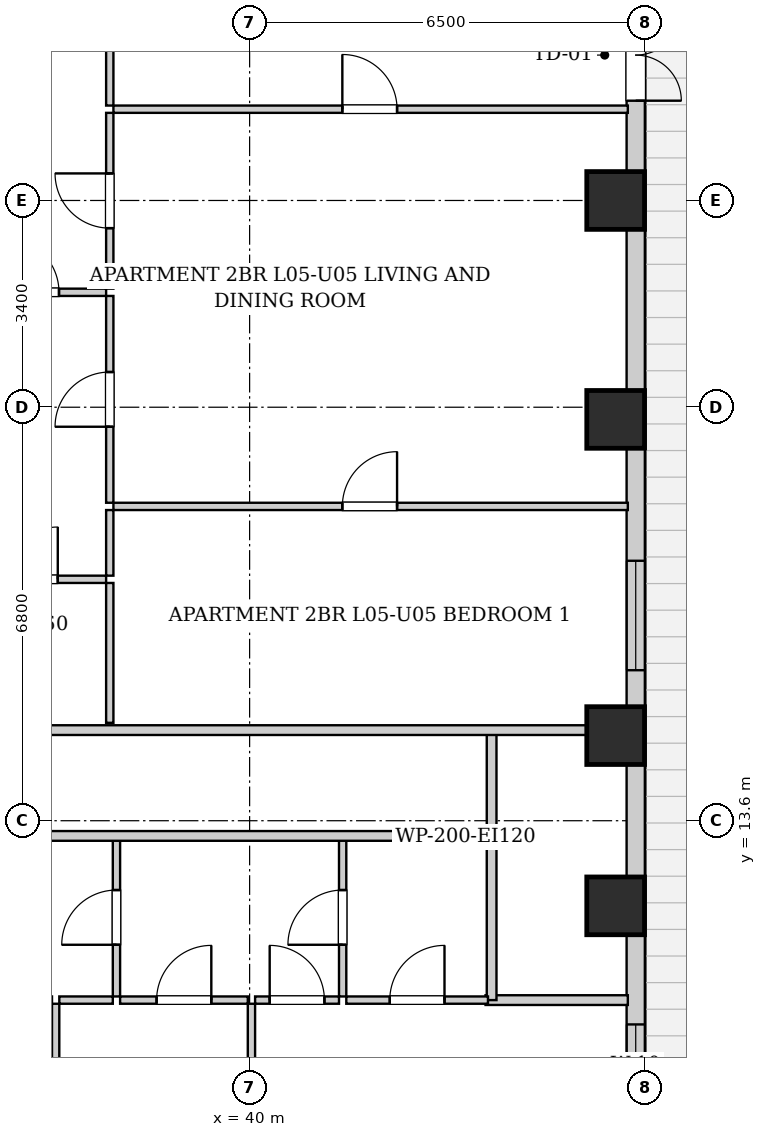
"""IFC4 building model, lengths in metres.
Left out: names, types, materials, properties, quantities, classifications, styles, units other than length and angle.
Written with IfcOpenShell. Run it as: python <this file> out.ifc"""

import sys

from ifc_helpers import new_model, si_unit, direction, frame, frame_2d, origin, origin_2d, place, context, subcontext, project, spatial, rectangle, extrude, element, fill, save


model = new_model("IFC4")
c1 = context("Model", 3, precision=1e-05, world=origin(), true_north=direction((0.0, 1.0)))
c2 = subcontext(c1, "Body", "Model", "MODEL_VIEW")
j1 = project(units=[si_unit("LENGTHUNIT", "METRE"), si_unit("PLANEANGLEUNIT", "RADIAN")], contexts=[c1])
p1 = place(None, origin())
s1 = spatial("IfcSite", under=j1, at=p1, CompositionType="ELEMENT")
p2 = place(p1, origin())
s2 = spatial("IfcBuilding", under=s1, at=p2, CompositionType="ELEMENT")
p3 = place(p2, frame((0.0, 0.0, 25.8)))
s3 = spatial("IfcBuildingStorey", under=s2, at=p3, CompositionType="ELEMENT", Elevation=25.8)
for number, where, z_axis, x_axis in (
    (1, (46.02, 12.2, 0.0), (0.0, 0.0, 1.0), (1.0, 0.0, 0.0)),
    (2, (46.02, 15.0, 0.0), (0.0, 0.0, 1.0), (1.0, 0.0, 0.0)),
    (3, (46.02, 20.2, 0.0), (0.0, 0.0, 1.0), (1.0, 0.0, 0.0)),
    (4, (46.02, 23.8, 0.0), (0.0, 0.0, 1.0), (1.0, 0.0, 0.0)),
):
    element("IfcColumn", number, at=place(p3, frame(where, z_axis=z_axis, x_axis=x_axis)), inside=s3, PredefinedType="COLUMN", context=c2, shape_type="SweptSolid", body=[
        extrude(rectangle(XDim=0.95, YDim=0.95, at=origin_2d()), origin(), (0.0, 0.0, 1.0), 3.2),
    ])
p4 = place(p3, frame((46.35, 45.1, 0.0), z_axis=(0.0, 0.0, 1.0), x_axis=(0.0, -1.0, 0.0)))
e5 = element("IfcWall", 5, at=p4, inside=s3, PredefinedType="SOLIDWALL", context=c2, shape_type="SweptSolid", body=[
    extrude(rectangle(XDim=42.6, YDim=0.3, at=frame_2d((21.3, 0.0))), origin(), (0.0, 0.0, 1.0), 1.988),
])
p5 = place(p4, frame((18.159, 0.0, 0.0)))
e6 = element("IfcOpeningElement", 6, at=p5, cuts=e5, PredefinedType="OPENING", context=c2, shape_type="SweptSolid", body=[
    extrude(rectangle(XDim=1.5, YDim=1.982, at=frame_2d((0.75, 0.991))), frame((0.0, 0.16, 0.0), z_axis=(0.0, -1.0, 0.0), x_axis=(1.0, 0.0, 0.0)), (0.0, 0.0, 1.0), 0.32),
])
p6 = place(p4, frame((37.575, 0.0, 0.55)))
e7 = element("IfcOpeningElement", 7, at=p6, cuts=e5, PredefinedType="OPENING", context=c2, shape_type="SweptSolid", body=[
    extrude(rectangle(XDim=1.8, YDim=1.2, at=frame_2d((0.9, 0.6))), frame((0.0, 0.16, 0.0), z_axis=(0.0, -1.0, 0.0), x_axis=(1.0, 0.0, 0.0)), (0.0, 0.0, 1.0), 0.32),
])
p7 = place(p4, frame((34.85, 0.0, 0.55)))
e8 = element("IfcOpeningElement", 8, at=p7, cuts=e5, PredefinedType="OPENING", context=c2, shape_type="SweptSolid", body=[
    extrude(rectangle(XDim=1.35, YDim=1.2, at=frame_2d((0.675, 0.6))), frame((0.0, 0.16, 0.0), z_axis=(0.0, -1.0, 0.0), x_axis=(1.0, 0.0, 0.0)), (0.0, 0.0, 1.0), 0.32),
])
p8 = place(p4, frame((3.665, 0.0, 0.55)))
e9 = element("IfcOpeningElement", 9, at=p8, cuts=e5, PredefinedType="OPENING", context=c2, shape_type="SweptSolid", body=[
    extrude(rectangle(XDim=1.8, YDim=1.2, at=frame_2d((0.9, 0.6))), frame((0.0, 0.16, 0.0), z_axis=(0.0, -1.0, 0.0), x_axis=(1.0, 0.0, 0.0)), (0.0, 0.0, 1.0), 0.32),
])
p9 = place(p4, frame((1.185, 0.0, 0.55)))
e10 = element("IfcOpeningElement", 10, at=p9, cuts=e5, PredefinedType="OPENING", context=c2, shape_type="SweptSolid", body=[
    extrude(rectangle(XDim=1.35, YDim=1.2, at=frame_2d((0.675, 0.6))), frame((0.0, 0.16, 0.0), z_axis=(0.0, -1.0, 0.0), x_axis=(1.0, 0.0, 0.0)), (0.0, 0.0, 1.0), 0.32),
])
p10 = place(p4, frame((27.225, 0.0, 0.55)))
e11 = element("IfcOpeningElement", 11, at=p10, cuts=e5, PredefinedType="OPENING", context=c2, shape_type="SweptSolid", body=[
    extrude(rectangle(XDim=1.8, YDim=1.2, at=frame_2d((0.9, 0.6))), frame((0.0, 0.16, 0.0), z_axis=(0.0, -1.0, 0.0), x_axis=(1.0, 0.0, 0.0)), (0.0, 0.0, 1.0), 0.32),
])
p11 = place(p4, frame((17.149, 0.0, 0.55)))
e12 = element("IfcOpeningElement", 12, at=p11, cuts=e5, PredefinedType="OPENING", context=c2, shape_type="SweptSolid", body=[
    extrude(rectangle(XDim=0.85, YDim=1.2, at=frame_2d((0.425, 0.6))), frame((0.0, 0.16, 0.0), z_axis=(0.0, -1.0, 0.0), x_axis=(1.0, 0.0, 0.0)), (0.0, 0.0, 1.0), 0.32),
])
p12 = place(p3, frame((43.98, 13.35, 0.0), z_axis=(0.0, 0.0, 1.0), x_axis=(0.0, 1.0, 0.0)))
e13 = element("IfcWall", 13, at=p12, inside=s3, PredefinedType="PARTITIONING", context=c2, shape_type="SweptSolid", body=[
    extrude(rectangle(XDim=1.74, YDim=0.16, at=frame_2d((0.87, 0.0))), origin(), (0.0, 0.0, 1.0), 2.94),
])
p13 = place(p3, frame((35.11, 15.09, 0.0), z_axis=(0.0, 0.0, 1.0), x_axis=(1.0, 0.0, 0.0)))
e14 = element("IfcWall", 14, at=p13, inside=s3, PredefinedType="PARTITIONING", context=c2, shape_type="SweptSolid", body=[
    extrude(rectangle(XDim=11.11, YDim=0.16, at=frame_2d((5.555, 0.0))), origin(), (0.0, 0.0, 1.0), 2.155),
])
p14 = place(p3, frame((43.88, 10.65, 0.0), z_axis=(0.0, 0.0, 1.0), x_axis=(1.0, 0.0, 0.0)))
e15 = element("IfcWall", 15, at=p14, inside=s3, PredefinedType="PARTITIONING", context=c2, shape_type="SweptSolid", body=[
    extrude(rectangle(XDim=2.34, YDim=0.16, at=frame_2d((1.17, 0.0))), origin(), (0.0, 0.0, 1.0), 2.94),
])
p15 = place(p3, frame((43.98, 10.65, 0.0), z_axis=(0.0, 0.0, 1.0), x_axis=(0.0, 1.0, 0.0)))
e16 = element("IfcWall", 16, at=p15, inside=s3, PredefinedType="PARTITIONING", context=c2, shape_type="SweptSolid", body=[
    extrude(rectangle(XDim=2.66, YDim=0.16, at=frame_2d((1.33, 0.0))), origin(), (0.0, 0.0, 1.0), 2.94),
])
p16 = place(p3, frame((37.81, 10.71, 0.0), z_axis=(0.0, 0.0, 1.0), x_axis=(0.0, 1.0, 0.0)))
e17 = element("IfcWall", 17, at=p16, inside=s3, PredefinedType="PARTITIONING", context=c2, shape_type="SweptSolid", body=[
    extrude(rectangle(XDim=2.6, YDim=0.12, at=frame_2d((1.3, 0.0))), origin(), (0.0, 0.0, 1.0), 2.94),
])
p17 = place(p16, frame((0.85, 0.0, 0.0)))
e18 = element("IfcOpeningElement", 18, at=p17, cuts=e17, PredefinedType="OPENING", context=c2, shape_type="SweptSolid", body=[
    extrude(rectangle(XDim=0.9, YDim=2.05, at=frame_2d((0.45, 1.025))), frame((0.0, 0.07, 0.0), z_axis=(0.0, -1.0, 0.0), x_axis=(1.0, 0.0, 0.0)), (0.0, 0.0, 1.0), 0.14),
])
p18 = place(p3, frame((36.87, 10.65, 0.0), z_axis=(0.0, 0.0, 1.0), x_axis=(1.0, 0.0, 0.0)))
e19 = element("IfcWall", 19, at=p18, inside=s3, PredefinedType="PARTITIONING", context=c2, shape_type="SweptSolid", body=[
    extrude(rectangle(XDim=0.88, YDim=0.12, at=frame_2d((0.44, 0.0))), origin(), (0.0, 0.0, 1.0), 2.94),
])
p19 = place(p3, frame((41.53, 10.71, 0.0), z_axis=(0.0, 0.0, 1.0), x_axis=(0.0, 1.0, 0.0)))
e20 = element("IfcWall", 20, at=p19, inside=s3, PredefinedType="PARTITIONING", context=c2, shape_type="SweptSolid", body=[
    extrude(rectangle(XDim=2.6, YDim=0.12, at=frame_2d((1.3, 0.0))), origin(), (0.0, 0.0, 1.0), 2.94),
])
p20 = place(p19, frame((0.85, 0.0, 0.0)))
e21 = element("IfcOpeningElement", 21, at=p20, cuts=e20, PredefinedType="OPENING", context=c2, shape_type="SweptSolid", body=[
    extrude(rectangle(XDim=0.9, YDim=2.05, at=frame_2d((0.45, 1.025))), frame((0.0, 0.07, 0.0), z_axis=(0.0, -1.0, 0.0), x_axis=(1.0, 0.0, 0.0)), (0.0, 0.0, 1.0), 0.14),
])
p21 = place(p3, frame((37.87, 10.65, 0.0), z_axis=(0.0, 0.0, 1.0), x_axis=(1.0, 0.0, 0.0)))
e22 = element("IfcWall", 22, at=p21, inside=s3, PredefinedType="PARTITIONING", context=c2, shape_type="SweptSolid", body=[
    extrude(rectangle(XDim=2.1, YDim=0.12, at=frame_2d((1.05, 0.0))), origin(), (0.0, 0.0, 1.0), 2.94),
])
p22 = place(p21, frame((0.6, 0.0, 0.0)))
e23 = element("IfcOpeningElement", 23, at=p22, cuts=e22, PredefinedType="OPENING", context=c2, shape_type="SweptSolid", body=[
    extrude(rectangle(XDim=0.9, YDim=2.05, at=frame_2d((0.45, 1.025))), frame((0.0, 0.07, 0.0), z_axis=(0.0, -1.0, 0.0), x_axis=(1.0, 0.0, 0.0)), (0.0, 0.0, 1.0), 0.14),
])
p23 = place(p3, frame((40.09, 10.65, 0.0), z_axis=(0.0, 0.0, 1.0), x_axis=(1.0, 0.0, 0.0)))
e24 = element("IfcWall", 24, at=p23, inside=s3, PredefinedType="PARTITIONING", context=c2, shape_type="SweptSolid", body=[
    extrude(rectangle(XDim=1.38, YDim=0.12, at=frame_2d((0.69, 0.0))), origin(), (0.0, 0.0, 1.0), 2.94),
])
p24 = place(p23, frame((0.24, 0.0, 0.0)))
e25 = element("IfcOpeningElement", 25, at=p24, cuts=e24, PredefinedType="OPENING", context=c2, shape_type="SweptSolid", body=[
    extrude(rectangle(XDim=0.9, YDim=2.05, at=frame_2d((0.45, 1.025))), frame((0.0, 0.07, 0.0), z_axis=(0.0, -1.0, 0.0), x_axis=(1.0, 0.0, 0.0)), (0.0, 0.0, 1.0), 0.14),
])
p25 = place(p3, frame((41.59, 10.65, 0.0), z_axis=(0.0, 0.0, 1.0), x_axis=(1.0, 0.0, 0.0)))
e26 = element("IfcWall", 26, at=p25, inside=s3, PredefinedType="PARTITIONING", context=c2, shape_type="SweptSolid", body=[
    extrude(rectangle(XDim=2.33, YDim=0.12, at=frame_2d((1.165, 0.0))), origin(), (0.0, 0.0, 1.0), 2.94),
])
p26 = place(p25, frame((0.715, 0.0, 0.0)))
e27 = element("IfcOpeningElement", 27, at=p26, cuts=e26, PredefinedType="OPENING", context=c2, shape_type="SweptSolid", body=[
    extrude(rectangle(XDim=0.9, YDim=2.05, at=frame_2d((0.45, 1.025))), frame((0.0, 0.07, 0.0), z_axis=(0.0, -1.0, 0.0), x_axis=(1.0, 0.0, 0.0)), (0.0, 0.0, 1.0), 0.14),
])
p27 = place(p3, frame((36.81, 0.28, 0.0), z_axis=(0.0, 0.0, 1.0), x_axis=(0.0, 1.0, 0.0)))
e28 = element("IfcWall", 28, at=p27, inside=s3, PredefinedType="PARTITIONING", context=c2, shape_type="SweptSolid", body=[
    extrude(rectangle(XDim=10.31, YDim=0.12, at=frame_2d((5.155, 0.0))), origin(), (0.0, 0.0, 1.0), 2.94),
])
p28 = place(p27, frame((4.69, 0.0, 0.0)))
e29 = element("IfcOpeningElement", 29, at=p28, cuts=e28, PredefinedType="OPENING", context=c2, shape_type="SweptSolid", body=[
    extrude(rectangle(XDim=0.9, YDim=2.05, at=frame_2d((0.45, 1.025))), frame((0.0, 0.07, 0.0), z_axis=(0.0, -1.0, 0.0), x_axis=(1.0, 0.0, 0.0)), (0.0, 0.0, 1.0), 0.14),
])
p29 = place(p3, frame((40.03, 0.28, 0.0), z_axis=(0.0, 0.0, 1.0), x_axis=(0.0, 1.0, 0.0)))
e30 = element("IfcWall", 30, at=p29, inside=s3, PredefinedType="PARTITIONING", context=c2, shape_type="SweptSolid", body=[
    extrude(rectangle(XDim=10.31, YDim=0.12, at=frame_2d((5.155, 0.0))), origin(), (0.0, 0.0, 1.0), 2.94),
])
p30 = place(p29, frame((4.69, 0.0, 0.0)))
e31 = element("IfcOpeningElement", 31, at=p30, cuts=e30, PredefinedType="OPENING", context=c2, shape_type="SweptSolid", body=[
    extrude(rectangle(XDim=0.9, YDim=2.05, at=frame_2d((0.45, 1.025))), frame((0.0, 0.07, 0.0), z_axis=(0.0, -1.0, 0.0), x_axis=(1.0, 0.0, 0.0)), (0.0, 0.0, 1.0), 0.14),
])
p31 = place(p3, frame((35.19, 22.29, 0.0), z_axis=(0.0, 0.0, 1.0), x_axis=(1.0, 0.0, 0.0)))
e32 = element("IfcWall", 32, at=p31, inside=s3, PredefinedType="PARTITIONING", context=c2, shape_type="SweptSolid", body=[
    extrude(rectangle(XDim=2.45, YDim=0.12, at=frame_2d((1.225, 0.0))), origin(), (0.0, 0.0, 1.0), 2.94),
])
p32 = place(p31, frame((0.775, 0.0, 0.0)))
e33 = element("IfcOpeningElement", 33, at=p32, cuts=e32, PredefinedType="OPENING", context=c2, shape_type="SweptSolid", body=[
    extrude(rectangle(XDim=0.9, YDim=2.05, at=frame_2d((0.45, 1.025))), frame((0.0, 0.07, 0.0), z_axis=(0.0, -1.0, 0.0), x_axis=(1.0, 0.0, 0.0)), (0.0, 0.0, 1.0), 0.14),
])
p33 = place(p3, frame((37.7, 22.35, 0.0), z_axis=(0.0, 0.0, 1.0), x_axis=(0.0, 1.0, 0.0)))
e34 = element("IfcWall", 34, at=p33, inside=s3, PredefinedType="PARTITIONING", context=c2, shape_type="SweptSolid", body=[
    extrude(rectangle(XDim=2.891, YDim=0.12, at=frame_2d((1.445, 0.0))), origin(), (0.0, 0.0, 1.0), 2.94),
])
p34 = place(p33, frame((0.995, 0.0, 0.0)))
e35 = element("IfcOpeningElement", 35, at=p34, cuts=e34, PredefinedType="OPENING", context=c2, shape_type="SweptSolid", body=[
    extrude(rectangle(XDim=0.9, YDim=2.05, at=frame_2d((0.45, 1.025))), frame((0.0, 0.07, 0.0), z_axis=(0.0, -1.0, 0.0), x_axis=(1.0, 0.0, 0.0)), (0.0, 0.0, 1.0), 0.14),
])
p35 = place(p3, frame((37.7, 25.361, 0.0), z_axis=(0.0, 0.0, 1.0), x_axis=(0.0, 1.0, 0.0)))
e36 = element("IfcWall", 36, at=p35, inside=s3, PredefinedType="PARTITIONING", context=c2, shape_type="SweptSolid", body=[
    extrude(rectangle(XDim=3.499, YDim=0.12, at=frame_2d((1.75, 0.0))), origin(), (0.0, 0.0, 1.0), 2.94),
])
p36 = place(p35, frame((1.299, 0.0, 0.0)))
e37 = element("IfcOpeningElement", 37, at=p36, cuts=e36, PredefinedType="OPENING", context=c2, shape_type="SweptSolid", body=[
    extrude(rectangle(XDim=0.9, YDim=2.05, at=frame_2d((0.45, 1.025))), frame((0.0, 0.07, 0.0), z_axis=(0.0, -1.0, 0.0), x_axis=(1.0, 0.0, 0.0)), (0.0, 0.0, 1.0), 0.14),
])
p37 = place(p3, frame((35.19, 17.57, 0.0), z_axis=(0.0, 0.0, 1.0), x_axis=(1.0, 0.0, 0.0)))
e38 = element("IfcWall", 38, at=p37, inside=s3, PredefinedType="PARTITIONING", context=c2, shape_type="SweptSolid", body=[
    extrude(rectangle(XDim=2.45, YDim=0.12, at=frame_2d((1.225, 0.0))), origin(), (0.0, 0.0, 1.0), 2.94),
])
p38 = place(p37, frame((0.795, 0.0, 0.0)))
e39 = element("IfcOpeningElement", 39, at=p38, cuts=e38, PredefinedType="OPENING", context=c2, shape_type="SweptSolid", body=[
    extrude(rectangle(XDim=0.86, YDim=2.05, at=frame_2d((0.43, 1.025))), frame((0.0, 0.07, 0.0), z_axis=(0.0, -1.0, 0.0), x_axis=(1.0, 0.0, 0.0)), (0.0, 0.0, 1.0), 0.14),
])
p39 = place(p3, frame((37.7, 15.21, 0.0), z_axis=(0.0, 0.0, 1.0), x_axis=(0.0, 1.0, 0.0)))
e40 = element("IfcWall", 40, at=p39, inside=s3, PredefinedType="PARTITIONING", context=c2, shape_type="SweptSolid", body=[
    extrude(rectangle(XDim=2.3, YDim=0.12, at=frame_2d((1.15, 0.0))), origin(), (0.0, 0.0, 1.0), 2.94),
])
p40 = place(p3, frame((37.7, 17.63, 0.0), z_axis=(0.0, 0.0, 1.0), x_axis=(0.0, 1.0, 0.0)))
e41 = element("IfcWall", 41, at=p40, inside=s3, PredefinedType="PARTITIONING", context=c2, shape_type="SweptSolid", body=[
    extrude(rectangle(XDim=1.079, YDim=0.12, at=frame_2d((0.54, 0.0))), origin(), (0.0, 0.0, 1.0), 2.94),
])
p41 = place(p3, frame((37.7, 18.829, 0.0), z_axis=(0.0, 0.0, 1.0), x_axis=(0.0, 1.0, 0.0)))
e42 = element("IfcWall", 42, at=p41, inside=s3, PredefinedType="PARTITIONING", context=c2, shape_type="SweptSolid", body=[
    extrude(rectangle(XDim=3.401, YDim=0.12, at=frame_2d((1.7, 0.0))), origin(), (0.0, 0.0, 1.0), 2.94),
])
p42 = place(p41, frame((1.25, 0.0, 0.0)))
e43 = element("IfcOpeningElement", 43, at=p42, cuts=e42, PredefinedType="OPENING", context=c2, shape_type="SweptSolid", body=[
    extrude(rectangle(XDim=0.9, YDim=2.05, at=frame_2d((0.45, 1.025))), frame((0.0, 0.07, 0.0), z_axis=(0.0, -1.0, 0.0), x_axis=(1.0, 0.0, 0.0)), (0.0, 0.0, 1.0), 0.14),
])
p43 = place(p3, frame((37.76, 18.769, 0.0), z_axis=(0.0, 0.0, 1.0), x_axis=(1.0, 0.0, 0.0)))
e44 = element("IfcWall", 44, at=p43, inside=s3, PredefinedType="PARTITIONING", context=c2, shape_type="SweptSolid", body=[
    extrude(rectangle(XDim=8.46, YDim=0.12, at=frame_2d((4.23, 0.0))), origin(), (0.0, 0.0, 1.0), 2.94),
])
p44 = place(p43, frame((3.765, 0.0, 0.0)))
e45 = element("IfcOpeningElement", 45, at=p44, cuts=e44, PredefinedType="OPENING", context=c2, shape_type="SweptSolid", body=[
    extrude(rectangle(XDim=0.9, YDim=2.05, at=frame_2d((0.45, 1.025))), frame((0.0, 0.07, 0.0), z_axis=(0.0, -1.0, 0.0), x_axis=(1.0, 0.0, 0.0)), (0.0, 0.0, 1.0), 0.14),
])
p45 = place(p3, frame((37.76, 25.301, 0.0), z_axis=(0.0, 0.0, 1.0), x_axis=(1.0, 0.0, 0.0)))
e46 = element("IfcWall", 46, at=p45, inside=s3, PredefinedType="PARTITIONING", context=c2, shape_type="SweptSolid", body=[
    extrude(rectangle(XDim=8.46, YDim=0.12, at=frame_2d((4.23, 0.0))), origin(), (0.0, 0.0, 1.0), 2.94),
])
p46 = place(p45, frame((3.765, 0.0, 0.0)))
e47 = element("IfcOpeningElement", 47, at=p46, cuts=e46, PredefinedType="OPENING", context=c2, shape_type="SweptSolid", body=[
    extrude(rectangle(XDim=0.9, YDim=2.05, at=frame_2d((0.45, 1.025))), frame((0.0, 0.07, 0.0), z_axis=(0.0, -1.0, 0.0), x_axis=(1.0, 0.0, 0.0)), (0.0, 0.0, 1.0), 0.14),
])
p47 = place(p3, frame((10.05, 13.35, 0.0), z_axis=(0.0, 0.0, 1.0), x_axis=(1.0, 0.0, 0.0)))
e48 = element("IfcWall", 48, at=p47, inside=s3, PredefinedType="PARTITIONING", context=c2, shape_type="SweptSolid", body=[
    extrude(rectangle(XDim=33.9, YDim=0.16, at=frame_2d((16.95, 0.0))), origin(), (0.0, 0.0, 1.0), 2.94),
])
p48 = place(p47, frame((4.165, 0.0, 0.0)))
e49 = element("IfcOpeningElement", 49, at=p48, cuts=e48, PredefinedType="OPENING", context=c2, shape_type="SweptSolid", body=[
    extrude(rectangle(XDim=0.95, YDim=2.1, at=frame_2d((0.475, 1.05))), frame((0.0, 0.09, 0.0), z_axis=(0.0, -1.0, 0.0), x_axis=(1.0, 0.0, 0.0)), (0.0, 0.0, 1.0), 0.18),
])
p49 = place(p17, origin())
e50 = element("IfcDoor", 50, at=p49, inside=s3, OperationType="SINGLE_SWING_LEFT", PredefinedType="DOOR", context=c2, shape_type="SweptSolid", body=[
    extrude(rectangle(XDim=0.9, YDim=2.05, at=frame_2d((0.45, 1.025))), frame((0.0, 0.025, 0.0), z_axis=(0.0, -1.0, 0.0), x_axis=(1.0, 0.0, 0.0)), (0.0, 0.0, 1.0), 0.05),
])
fill(e18, e50)
p50 = place(p20, origin())
e51 = element("IfcDoor", 51, at=p50, inside=s3, OperationType="SINGLE_SWING_LEFT", PredefinedType="DOOR", context=c2, shape_type="SweptSolid", body=[
    extrude(rectangle(XDim=0.9, YDim=2.05, at=frame_2d((0.45, 1.025))), frame((0.0, 0.025, 0.0), z_axis=(0.0, -1.0, 0.0), x_axis=(1.0, 0.0, 0.0)), (0.0, 0.0, 1.0), 0.05),
])
fill(e21, e51)
p51 = place(p22, origin())
e52 = element("IfcDoor", 52, at=p51, inside=s3, OperationType="SINGLE_SWING_RIGHT", PredefinedType="DOOR", context=c2, shape_type="SweptSolid", body=[
    extrude(rectangle(XDim=0.9, YDim=2.05, at=frame_2d((0.45, 1.025))), frame((0.0, 0.025, 0.0), z_axis=(0.0, -1.0, 0.0), x_axis=(1.0, 0.0, 0.0)), (0.0, 0.0, 1.0), 0.05),
])
fill(e23, e52)
p52 = place(p24, origin())
e53 = element("IfcDoor", 53, at=p52, inside=s3, OperationType="SINGLE_SWING_LEFT", PredefinedType="DOOR", context=c2, shape_type="SweptSolid", body=[
    extrude(rectangle(XDim=0.9, YDim=2.05, at=frame_2d((0.45, 1.025))), frame((0.0, 0.025, 0.0), z_axis=(0.0, -1.0, 0.0), x_axis=(1.0, 0.0, 0.0)), (0.0, 0.0, 1.0), 0.05),
])
fill(e25, e53)
p53 = place(p26, origin())
e54 = element("IfcDoor", 54, at=p53, inside=s3, OperationType="SINGLE_SWING_RIGHT", PredefinedType="DOOR", context=c2, shape_type="SweptSolid", body=[
    extrude(rectangle(XDim=0.9, YDim=2.05, at=frame_2d((0.45, 1.025))), frame((0.0, 0.025, 0.0), z_axis=(0.0, -1.0, 0.0), x_axis=(1.0, 0.0, 0.0)), (0.0, 0.0, 1.0), 0.05),
])
fill(e27, e54)
p54 = place(p32, origin())
e55 = element("IfcDoor", 55, at=p54, inside=s3, OperationType="SINGLE_SWING_LEFT", PredefinedType="DOOR", context=c2, shape_type="SweptSolid", body=[
    extrude(rectangle(XDim=0.9, YDim=2.05, at=frame_2d((0.45, 1.025))), frame((0.0, 0.025, 0.0), z_axis=(0.0, -1.0, 0.0), x_axis=(1.0, 0.0, 0.0)), (0.0, 0.0, 1.0), 0.05),
])
fill(e33, e55)
p55 = place(p34, origin())
e56 = element("IfcDoor", 56, at=p55, inside=s3, OperationType="SINGLE_SWING_RIGHT", PredefinedType="DOOR", context=c2, shape_type="SweptSolid", body=[
    extrude(rectangle(XDim=0.9, YDim=2.05, at=frame_2d((0.45, 1.025))), frame((0.0, 0.025, 0.0), z_axis=(0.0, -1.0, 0.0), x_axis=(1.0, 0.0, 0.0)), (0.0, 0.0, 1.0), 0.05),
])
fill(e35, e56)
p56 = place(p38, origin())
e57 = element("IfcDoor", 57, at=p56, inside=s3, OperationType="SINGLE_SWING_RIGHT", PredefinedType="DOOR", context=c2, shape_type="SweptSolid", body=[
    extrude(rectangle(XDim=0.86, YDim=2.05, at=frame_2d((0.43, 1.025))), frame((0.0, 0.025, 0.0), z_axis=(0.0, -1.0, 0.0), x_axis=(1.0, 0.0, 0.0)), (0.0, 0.0, 1.0), 0.05),
])
fill(e39, e57)
p57 = place(p42, origin())
e58 = element("IfcDoor", 58, at=p57, inside=s3, OperationType="SINGLE_SWING_LEFT", PredefinedType="DOOR", context=c2, shape_type="SweptSolid", body=[
    extrude(rectangle(XDim=0.9, YDim=2.05, at=frame_2d((0.45, 1.025))), frame((0.0, 0.025, 0.0), z_axis=(0.0, -1.0, 0.0), x_axis=(1.0, 0.0, 0.0)), (0.0, 0.0, 1.0), 0.05),
])
fill(e43, e58)
p58 = place(p44, origin())
e59 = element("IfcDoor", 59, at=p58, inside=s3, OperationType="SINGLE_SWING_RIGHT", PredefinedType="DOOR", context=c2, shape_type="SweptSolid", body=[
    extrude(rectangle(XDim=0.9, YDim=2.05, at=frame_2d((0.45, 1.025))), frame((0.0, 0.025, 0.0), z_axis=(0.0, -1.0, 0.0), x_axis=(1.0, 0.0, 0.0)), (0.0, 0.0, 1.0), 0.05),
])
fill(e45, e59)
p59 = place(p46, origin())
e60 = element("IfcDoor", 60, at=p59, inside=s3, OperationType="SINGLE_SWING_LEFT", PredefinedType="DOOR", context=c2, shape_type="SweptSolid", body=[
    extrude(rectangle(XDim=0.9, YDim=2.05, at=frame_2d((0.45, 1.025))), frame((0.0, 0.025, 0.0), z_axis=(0.0, -1.0, 0.0), x_axis=(1.0, 0.0, 0.0)), (0.0, 0.0, 1.0), 0.05),
])
fill(e47, e60)
p60 = place(p5, origin())
e61 = element("IfcDoor", 61, at=p60, inside=s3, OperationType="DOUBLE_SWING_LEFT", PredefinedType="DOOR", context=c2, shape_type="SweptSolid", body=[
    extrude(rectangle(XDim=1.5, YDim=1.982, at=frame_2d((0.75, 0.991))), frame((0.0, 0.025, 0.0), z_axis=(0.0, -1.0, 0.0), x_axis=(1.0, 0.0, 0.0)), (0.0, 0.0, 1.0), 0.05),
])
fill(e6, e61)
p61 = place(p7, origin())
e62 = element("IfcWindow", 62, at=p61, inside=s3, PartitioningType="SINGLE_PANEL", PredefinedType="WINDOW", context=c2, shape_type="SweptSolid", body=[
    extrude(rectangle(XDim=1.35, YDim=1.2, at=frame_2d((0.675, 0.6))), frame((0.0, 0.03, 0.0), z_axis=(0.0, -1.0, 0.0), x_axis=(1.0, 0.0, 0.0)), (0.0, 0.0, 1.0), 0.06),
])
fill(e8, e62)
p62 = place(p10, origin())
e63 = element("IfcWindow", 63, at=p62, inside=s3, PartitioningType="DOUBLE_PANEL_VERTICAL", PredefinedType="WINDOW", context=c2, shape_type="SweptSolid", body=[
    extrude(rectangle(XDim=1.8, YDim=1.2, at=frame_2d((0.9, 0.6))), frame((0.0, 0.03, 0.0), z_axis=(0.0, -1.0, 0.0), x_axis=(1.0, 0.0, 0.0)), (0.0, 0.0, 1.0), 0.06),
])
fill(e11, e63)
save(model, sys.argv[1])
